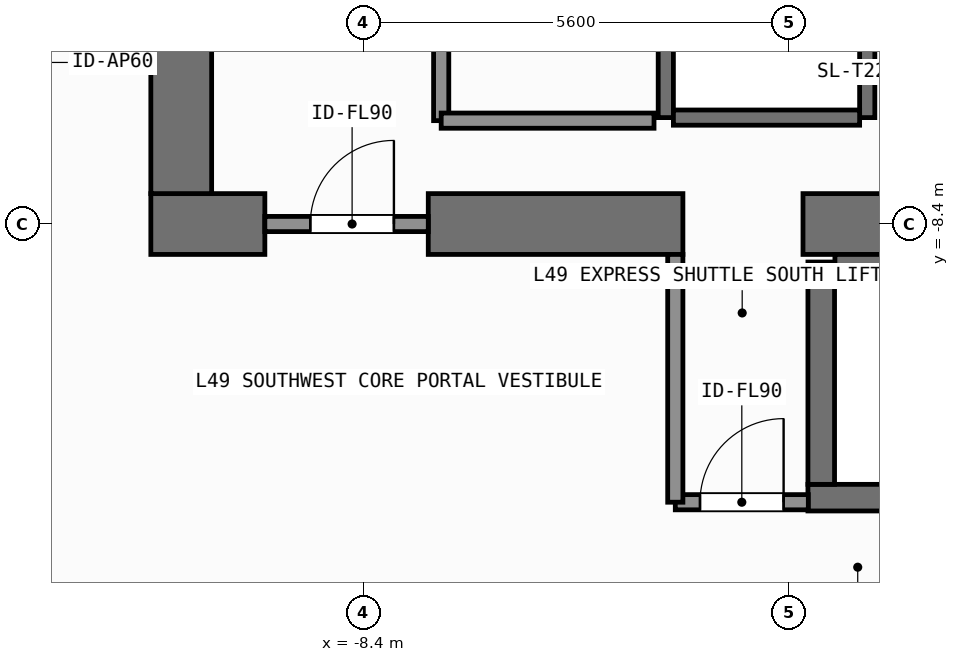
"""IFC4 building model, lengths in metres.
Left out: names, types, materials, properties, quantities, classifications, styles, units other than length and angle.
Written with IfcOpenShell. Run it as: python <this file> out.ifc"""

import sys

from ifc_helpers import new_model, si_unit, direction, frame, frame_2d, origin, place, context, subcontext, project, spatial, rectangle, extrude, element, fill, save


model = new_model("IFC4")
c1 = context("Model", 3, precision=1e-05, world=origin(), true_north=direction((0.0, 1.0)))
c2 = subcontext(c1, "Body", "Model", "MODEL_VIEW")
j1 = project(units=[si_unit("LENGTHUNIT", "METRE"), si_unit("PLANEANGLEUNIT", "RADIAN")], contexts=[c1])
p1 = place(None, origin())
s1 = spatial("IfcSite", under=j1, at=p1, CompositionType="ELEMENT")
p2 = place(p1, origin())
s2 = spatial("IfcBuilding", under=s1, at=p2, CompositionType="ELEMENT")
p3 = place(p2, frame((0.0, 0.0, 199.2)))
s3 = spatial("IfcBuildingStorey", under=s2, at=p3, CompositionType="ELEMENT", Elevation=199.2)
p4 = place(p3, frame((-11.2, -8.4, 0.0), z_axis=(0.0, 0.0, 1.0), x_axis=(1.0, 0.0, 0.0)))
e1 = element("IfcWall", 1, at=p4, inside=s3, PredefinedType="SHEAR", context=c2, shape_type="SweptSolid", body=[
    extrude(rectangle(XDim=1.5, YDim=0.8, at=frame_2d((0.75, 0.0))), origin(), (0.0, 0.0, 1.0), 3.9),
])
p5 = place(p3, frame((-7.55, -8.4, 0.0), z_axis=(0.0, 0.0, 1.0), x_axis=(1.0, 0.0, 0.0)))
e2 = element("IfcWall", 2, at=p5, inside=s3, PredefinedType="SHEAR", context=c2, shape_type="SweptSolid", body=[
    extrude(rectangle(XDim=3.35, YDim=0.8, at=frame_2d((1.675, 0.0))), origin(), (0.0, 0.0, 1.0), 3.9),
])
p6 = place(p3, frame((-2.62, -8.4, 0.0), z_axis=(0.0, 0.0, 1.0), x_axis=(1.0, 0.0, 0.0)))
e3 = element("IfcWall", 3, at=p6, inside=s3, PredefinedType="SHEAR", context=c2, shape_type="SweptSolid", body=[
    extrude(rectangle(XDim=7.27, YDim=0.8, at=frame_2d((3.635, 0.0))), origin(), (0.0, 0.0, 1.0), 3.9),
])
p7 = place(p3, frame((-10.8, -8.0, 0.0), z_axis=(0.0, 0.0, 1.0), x_axis=(0.0, 1.0, 0.0)))
e4 = element("IfcWall", 4, at=p7, inside=s3, PredefinedType="SHEAR", context=c2, shape_type="SweptSolid", body=[
    extrude(rectangle(XDim=16.0, YDim=0.8, at=frame_2d((8.0, 0.0))), origin(), (0.0, 0.0, 1.0), 3.9),
])
p8 = place(p3, frame((-2.555, -12.0, 0.0), z_axis=(0.0, 0.0, 1.0), x_axis=(1.0, 0.0, 0.0)))
e5 = element("IfcWall", 5, at=p8, inside=s3, PredefinedType="SHEAR", context=c2, shape_type="SweptSolid", body=[
    extrude(rectangle(XDim=7.31, YDim=0.35, at=frame_2d((3.655, 0.0))), origin(), (0.0, 0.0, 1.0), 3.9),
])
p9 = place(p3, frame((-2.2, -8.913, 0.0), z_axis=(0.0, 0.0, 1.0), x_axis=(1.0, 0.0, 0.0)))
e6 = element("IfcWall", 6, at=p9, inside=s3, PredefinedType="SHEAR", context=c2, shape_type="SweptSolid", body=[
    extrude(rectangle(XDim=6.6, YDim=0.225, at=frame_2d((3.3, 0.0))), origin(), (0.0, 0.0, 1.0), 3.9),
])
p10 = place(p3, frame((-2.38, -11.825, 0.0), z_axis=(0.0, 0.0, 1.0), x_axis=(0.0, 1.0, 0.0)))
e7 = element("IfcWall", 7, at=p10, inside=s3, PredefinedType="SHEAR", context=c2, shape_type="SweptSolid", body=[
    extrude(rectangle(XDim=2.925, YDim=0.35, at=frame_2d((1.462, 0.0))), origin(), (0.0, 0.0, 1.0), 3.9),
])
for number, where, z_axis, x_axis in (
    (8, (-4.425, -7.0, 0.0), (0.0, 0.0, 1.0), (0.0, 1.0, 0.0)),
    (9, (-1.775, -7.0, 0.0), (0.0, 0.0, 1.0), (0.0, 1.0, 0.0)),
):
    element("IfcWall", number, at=place(p3, frame(where, z_axis=z_axis, x_axis=x_axis)), inside=s3, PredefinedType="SHEAR", context=c2, shape_type="SweptSolid", body=[
        extrude(rectangle(XDim=2.8, YDim=0.2, at=frame_2d((1.4, 0.0))), origin(), (0.0, 0.0, 1.0), 3.68),
    ])
p11 = place(p3, frame((-4.325, -7.0, 0.0), z_axis=(0.0, 0.0, 1.0), x_axis=(1.0, 0.0, 0.0)))
e10 = element("IfcWall", 10, at=p11, inside=s3, PredefinedType="SHEAR", context=c2, shape_type="SweptSolid", body=[
    extrude(rectangle(XDim=2.45, YDim=0.2, at=frame_2d((1.225, 0.0))), origin(), (0.0, 0.0, 1.0), 3.68),
])
p12 = place(p3, frame((-9.7, -8.4, 0.0), z_axis=(0.0, 0.0, 1.0), x_axis=(1.0, 0.0, 0.0)))
e11 = element("IfcWall", 11, at=p12, inside=s3, PredefinedType="SOLIDWALL", context=c2, shape_type="SweptSolid", body=[
    extrude(rectangle(XDim=2.15, YDim=0.2, at=frame_2d((1.075, 0.0))), origin(), (0.0, 0.0, 1.0), 2.82),
])
p13 = place(p12, frame((0.598, 0.0, 0.0)))
e12 = element("IfcOpeningElement", 12, at=p13, cuts=e11, PredefinedType="OPENING", context=c2, shape_type="SweptSolid", body=[
    extrude(rectangle(XDim=1.1, YDim=2.15, at=frame_2d((0.55, 1.075))), frame((0.0, 0.11, 0.0), z_axis=(0.0, -1.0, 0.0), x_axis=(1.0, 0.0, 0.0)), (0.0, 0.0, 1.0), 0.22),
])
p14 = place(p3, frame((-4.3, -12.06, 0.0), z_axis=(0.0, 0.0, 1.0), x_axis=(1.0, 0.0, 0.0)))
e13 = element("IfcWall", 13, at=p14, inside=s3, PredefinedType="SOLIDWALL", context=c2, shape_type="SweptSolid", body=[
    extrude(rectangle(XDim=1.75, YDim=0.2, at=frame_2d((0.875, 0.0))), origin(), (0.0, 0.0, 1.0), 3.68),
])
p15 = place(p14, frame((0.325, 0.0, 0.0)))
e14 = element("IfcOpeningElement", 14, at=p15, cuts=e13, PredefinedType="OPENING", context=c2, shape_type="SweptSolid", body=[
    extrude(rectangle(XDim=1.1, YDim=2.15, at=frame_2d((0.55, 1.075))), frame((0.0, 0.11, 0.0), z_axis=(0.0, -1.0, 0.0), x_axis=(1.0, 0.0, 0.0)), (0.0, 0.0, 1.0), 0.22),
])
p16 = place(p3, frame((-7.38, -7.04, 0.0), z_axis=(0.0, 0.0, 1.0), x_axis=(0.0, 1.0, 0.0)))
e15 = element("IfcWall", 15, at=p16, inside=s3, PredefinedType="SOLIDWALL", context=c2, shape_type="SweptSolid", body=[
    extrude(rectangle(XDim=5.72, YDim=0.2, at=frame_2d((2.86, 0.0))), origin(), (0.0, 0.0, 1.0), 3.68),
])
p17 = place(p16, frame((2.31, 0.0, 0.0)))
e16 = element("IfcOpeningElement", 16, at=p17, cuts=e15, PredefinedType="OPENING", context=c2, shape_type="SweptSolid", body=[
    extrude(rectangle(XDim=0.92, YDim=2.1, at=frame_2d((0.46, 1.05))), frame((0.0, 0.11, 0.0), z_axis=(0.0, -1.0, 0.0), x_axis=(1.0, 0.0, 0.0)), (0.0, 0.0, 1.0), 0.22),
])
p18 = place(p3, frame((-4.3, -12.06, 0.0), z_axis=(0.0, 0.0, 1.0), x_axis=(0.0, 1.0, 0.0)))
e17 = element("IfcWall", 17, at=p18, inside=s3, PredefinedType="SOLIDWALL", context=c2, shape_type="SweptSolid", body=[
    extrude(rectangle(XDim=3.26, YDim=0.2, at=frame_2d((1.63, 0.0))), origin(), (0.0, 0.0, 1.0), 3.68),
])
p19 = place(p3, frame((-7.38, -7.04, 0.0), z_axis=(0.0, 0.0, 1.0), x_axis=(1.0, 0.0, 0.0)))
e18 = element("IfcWall", 18, at=p19, inside=s3, PredefinedType="SOLIDWALL", context=c2, shape_type="SweptSolid", body=[
    extrude(rectangle(XDim=2.8, YDim=0.2, at=frame_2d((1.4, 0.0))), origin(), (0.0, 0.0, 1.0), 3.68),
])
p20 = place(p13, origin())
e19 = element("IfcDoor", 19, at=p20, inside=s3, OperationType="SINGLE_SWING_RIGHT", PredefinedType="DOOR", context=c2, shape_type="SweptSolid", body=[
    extrude(rectangle(XDim=1.1, YDim=2.15, at=frame_2d((0.55, 1.075))), frame((0.0, 0.025, 0.0), z_axis=(0.0, -1.0, 0.0), x_axis=(1.0, 0.0, 0.0)), (0.0, 0.0, 1.0), 0.05),
])
fill(e12, e19)
p21 = place(p15, origin())
e20 = element("IfcDoor", 20, at=p21, inside=s3, OperationType="SINGLE_SWING_RIGHT", PredefinedType="DOOR", context=c2, shape_type="SweptSolid", body=[
    extrude(rectangle(XDim=1.1, YDim=2.15, at=frame_2d((0.55, 1.075))), frame((0.0, 0.025, 0.0), z_axis=(0.0, -1.0, 0.0), x_axis=(1.0, 0.0, 0.0)), (0.0, 0.0, 1.0), 0.05),
])
fill(e14, e20)
save(model, sys.argv[1])
